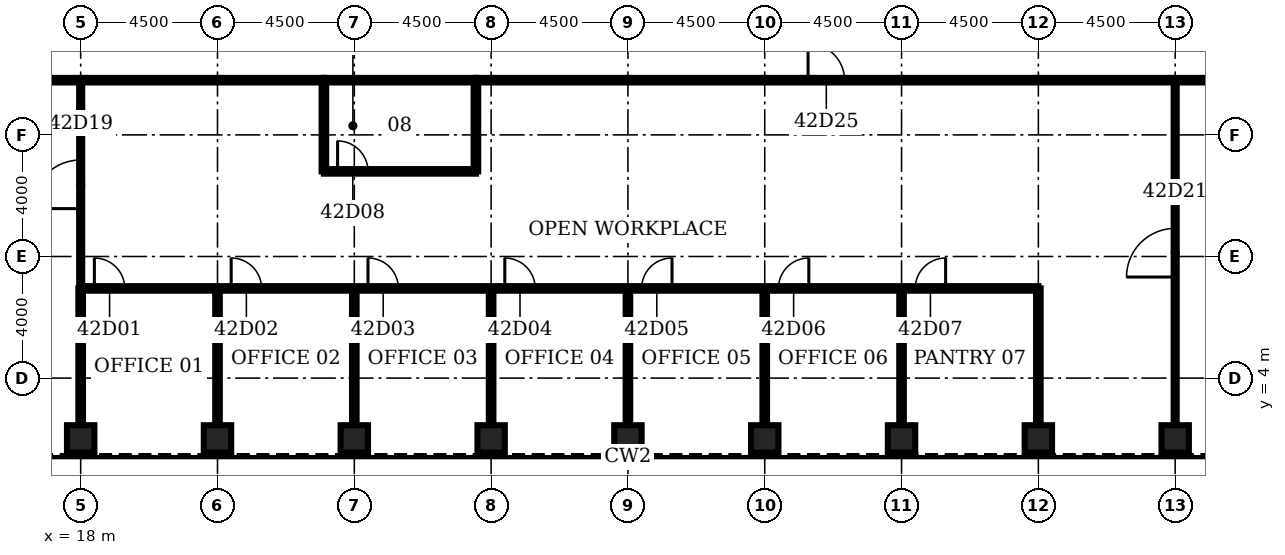
"""IFC4 building model, lengths in metres.
Left out: names, types, materials, properties, quantities, classifications, styles, units other than length and angle.
Written with IfcOpenShell. Run it as: python <this file> out.ifc"""

import sys

from ifc_helpers import new_model, si_unit, direction, frame, frame_2d, origin, origin_2d, place, context, subcontext, project, spatial, rectangle, hollow_rectangle, extrude, element, fill, save


model = new_model("IFC4")
c1 = context("Model", 3, precision=1e-05, world=origin(), true_north=direction((0.0, 1.0)))
c2 = subcontext(c1, "Body", "Model", "MODEL_VIEW")
j1 = project(units=[si_unit("LENGTHUNIT", "METRE"), si_unit("PLANEANGLEUNIT", "RADIAN")], contexts=[c1])
p1 = place(None, origin())
s1 = spatial("IfcSite", under=j1, at=p1, CompositionType="ELEMENT")
p2 = place(p1, origin())
s2 = spatial("IfcBuilding", under=s1, at=p2, CompositionType="ELEMENT")
p3 = place(p2, frame((0.0, 0.0, 190.0)))
s3 = spatial("IfcBuildingStorey", under=s2, at=p3, CompositionType="ELEMENT", Elevation=190.0)
for number, where, z_axis, x_axis in (
    (1, (18.0, 2.0, 0.0), (0.0, 0.0, 1.0), (0.0, 1.0, 0.0)),
    (2, (22.5, 2.0, 0.0), (0.0, 0.0, 1.0), (0.0, 1.0, 0.0)),
    (3, (27.0, 2.0, 0.0), (0.0, 0.0, 1.0), (0.0, 1.0, 0.0)),
    (4, (31.5, 2.0, 0.0), (0.0, 0.0, 1.0), (0.0, 1.0, 0.0)),
    (5, (36.0, 2.0, 0.0), (0.0, 0.0, 1.0), (0.0, 1.0, 0.0)),
    (6, (40.5, 2.0, 0.0), (0.0, 0.0, 1.0), (0.0, 1.0, 0.0)),
    (7, (45.0, 2.0, 0.0), (0.0, 0.0, 1.0), (0.0, 1.0, 0.0)),
    (8, (49.5, 2.0, 0.0), (0.0, 0.0, 1.0), (0.0, 1.0, 0.0)),
    (9, (54.0, 2.0, 0.0), (0.0, 0.0, 1.0), (0.0, 1.0, 0.0)),
):
    element("IfcColumn", number, at=place(p3, frame(where, z_axis=z_axis, x_axis=x_axis)), inside=s3, PredefinedType="COLUMN", context=c2, shape_type="SweptSolid", body=[
        extrude(hollow_rectangle(XDim=0.9, YDim=0.9, WallThickness=0.09, at=origin_2d()), origin(), (0.0, 0.0, 1.0), 4.2),
    ])
p4 = place(p3, frame((18.0, 6.95, 0.0), z_axis=(0.0, 0.0, 1.0), x_axis=(1.0, 0.0, 0.0)))
e10 = element("IfcWall", 10, at=p4, inside=s3, PredefinedType="PARTITIONING", context=c2, shape_type="SweptSolid", body=[
    extrude(rectangle(XDim=31.5, YDim=0.15, at=frame_2d((15.75, 0.0))), origin(), (0.0, 0.0, 1.0), 3.0),
])
p5 = place(p4, frame((0.45, 0.0, 0.0)))
e11 = element("IfcOpeningElement", 11, at=p5, cuts=e10, PredefinedType="OPENING", context=c2, shape_type="SweptSolid", body=[
    extrude(rectangle(XDim=1.0, YDim=2.1, at=frame_2d((0.5, 1.05))), frame((0.0, 0.085, 0.0), z_axis=(0.0, -1.0, 0.0), x_axis=(1.0, 0.0, 0.0)), (0.0, 0.0, 1.0), 0.17),
])
p6 = place(p4, frame((4.95, 0.0, 0.0)))
e12 = element("IfcOpeningElement", 12, at=p6, cuts=e10, PredefinedType="OPENING", context=c2, shape_type="SweptSolid", body=[
    extrude(rectangle(XDim=1.0, YDim=2.1, at=frame_2d((0.5, 1.05))), frame((0.0, 0.085, 0.0), z_axis=(0.0, -1.0, 0.0), x_axis=(1.0, 0.0, 0.0)), (0.0, 0.0, 1.0), 0.17),
])
p7 = place(p4, frame((9.45, 0.0, 0.0)))
e13 = element("IfcOpeningElement", 13, at=p7, cuts=e10, PredefinedType="OPENING", context=c2, shape_type="SweptSolid", body=[
    extrude(rectangle(XDim=1.0, YDim=2.1, at=frame_2d((0.5, 1.05))), frame((0.0, 0.085, 0.0), z_axis=(0.0, -1.0, 0.0), x_axis=(1.0, 0.0, 0.0)), (0.0, 0.0, 1.0), 0.17),
])
p8 = place(p4, frame((13.95, 0.0, 0.0)))
e14 = element("IfcOpeningElement", 14, at=p8, cuts=e10, PredefinedType="OPENING", context=c2, shape_type="SweptSolid", body=[
    extrude(rectangle(XDim=1.0, YDim=2.1, at=frame_2d((0.5, 1.05))), frame((0.0, 0.085, 0.0), z_axis=(0.0, -1.0, 0.0), x_axis=(1.0, 0.0, 0.0)), (0.0, 0.0, 1.0), 0.17),
])
p9 = place(p4, frame((18.45, 0.0, 0.0)))
e15 = element("IfcOpeningElement", 15, at=p9, cuts=e10, PredefinedType="OPENING", context=c2, shape_type="SweptSolid", body=[
    extrude(rectangle(XDim=1.0, YDim=2.1, at=frame_2d((0.5, 1.05))), frame((0.0, 0.085, 0.0), z_axis=(0.0, -1.0, 0.0), x_axis=(1.0, 0.0, 0.0)), (0.0, 0.0, 1.0), 0.17),
])
p10 = place(p4, frame((22.95, 0.0, 0.0)))
e16 = element("IfcOpeningElement", 16, at=p10, cuts=e10, PredefinedType="OPENING", context=c2, shape_type="SweptSolid", body=[
    extrude(rectangle(XDim=1.0, YDim=2.1, at=frame_2d((0.5, 1.05))), frame((0.0, 0.085, 0.0), z_axis=(0.0, -1.0, 0.0), x_axis=(1.0, 0.0, 0.0)), (0.0, 0.0, 1.0), 0.17),
])
p11 = place(p4, frame((27.45, 0.0, 0.0)))
e17 = element("IfcOpeningElement", 17, at=p11, cuts=e10, PredefinedType="OPENING", context=c2, shape_type="SweptSolid", body=[
    extrude(rectangle(XDim=1.0, YDim=2.1, at=frame_2d((0.5, 1.05))), frame((0.0, 0.085, 0.0), z_axis=(0.0, -1.0, 0.0), x_axis=(1.0, 0.0, 0.0)), (0.0, 0.0, 1.0), 0.17),
])
p12 = place(p3, frame((26.0, 10.8, 0.0), z_axis=(0.0, 0.0, 1.0), x_axis=(1.0, 0.0, 0.0)))
e18 = element("IfcWall", 18, at=p12, inside=s3, PredefinedType="PARTITIONING", context=c2, shape_type="SweptSolid", body=[
    extrude(rectangle(XDim=5.0, YDim=0.15, at=frame_2d((2.5, 0.0))), origin(), (0.0, 0.0, 1.0), 3.0),
])
p13 = place(p12, frame((0.45, 0.0, 0.0)))
e19 = element("IfcOpeningElement", 19, at=p13, cuts=e18, PredefinedType="OPENING", context=c2, shape_type="SweptSolid", body=[
    extrude(rectangle(XDim=1.0, YDim=2.1, at=frame_2d((0.5, 1.05))), frame((0.0, 0.085, 0.0), z_axis=(0.0, -1.0, 0.0), x_axis=(1.0, 0.0, 0.0)), (0.0, 0.0, 1.0), 0.17),
])
p14 = place(p3, frame((15.2, 13.8, 0.0), z_axis=(0.0, 0.0, 1.0), x_axis=(1.0, 0.0, 0.0)))
e20 = element("IfcWall", 20, at=p14, inside=s3, PredefinedType="PARTITIONING", context=c2, shape_type="SweptSolid", body=[
    extrude(rectangle(XDim=10.8, YDim=0.15, at=frame_2d((5.4, 0.0))), origin(), (0.0, 0.0, 1.0), 3.0),
])
p15 = place(p3, frame((26.0, 13.8, 0.0), z_axis=(0.0, 0.0, 1.0), x_axis=(1.0, 0.0, 0.0)))
e21 = element("IfcWall", 21, at=p15, inside=s3, PredefinedType="PARTITIONING", context=c2, shape_type="SweptSolid", body=[
    extrude(rectangle(XDim=5.0, YDim=0.15, at=frame_2d((2.5, 0.0))), origin(), (0.0, 0.0, 1.0), 3.0),
])
p16 = place(p3, frame((31.0, 13.8, 0.0), z_axis=(0.0, 0.0, 1.0), x_axis=(1.0, 0.0, 0.0)))
e22 = element("IfcWall", 22, at=p16, inside=s3, PredefinedType="PARTITIONING", context=c2, shape_type="SweptSolid", body=[
    extrude(rectangle(XDim=25.8, YDim=0.15, at=frame_2d((12.9, 0.0))), origin(), (0.0, 0.0, 1.0), 3.0),
])
p17 = place(p16, frame((10.925, 0.0, 0.0)))
e23 = element("IfcOpeningElement", 23, at=p17, cuts=e22, PredefinedType="OPENING", context=c2, shape_type="SweptSolid", body=[
    extrude(rectangle(XDim=1.2, YDim=2.1, at=frame_2d((0.6, 1.05))), frame((0.0, 0.085, 0.0), z_axis=(0.0, -1.0, 0.0), x_axis=(1.0, 0.0, 0.0)), (0.0, 0.0, 1.0), 0.17),
])
p18 = place(p3, frame((18.0, 2.45, 0.0), z_axis=(0.0, 0.0, 1.0), x_axis=(0.0, 1.0, 0.0)))
e24 = element("IfcWall", 24, at=p18, inside=s3, PredefinedType="PARTITIONING", context=c2, shape_type="SweptSolid", body=[
    extrude(rectangle(XDim=4.5, YDim=0.15, at=frame_2d((2.25, 0.0))), origin(), (0.0, 0.0, 1.0), 3.0),
])
p19 = place(p3, frame((18.0, 6.95, 0.0), z_axis=(0.0, 0.0, 1.0), x_axis=(0.0, 1.0, 0.0)))
e25 = element("IfcWall", 25, at=p19, inside=s3, PredefinedType="PARTITIONING", context=c2, shape_type="SweptSolid", body=[
    extrude(rectangle(XDim=6.85, YDim=0.1, at=frame_2d((3.425, 0.0))), origin(), (0.0, 0.0, 1.0), 3.0),
])
p20 = place(p19, frame((2.625, 0.0, 0.0)))
e26 = element("IfcOpeningElement", 26, at=p20, cuts=e25, PredefinedType="OPENING", context=c2, shape_type="SweptSolid", body=[
    extrude(rectangle(XDim=1.6, YDim=2.1, at=frame_2d((0.8, 1.05))), frame((0.0, 0.06, 0.0), z_axis=(0.0, -1.0, 0.0), x_axis=(1.0, 0.0, 0.0)), (0.0, 0.0, 1.0), 0.12),
])
p21 = place(p3, frame((22.5, 2.45, 0.0), z_axis=(0.0, 0.0, 1.0), x_axis=(0.0, 1.0, 0.0)))
e27 = element("IfcWall", 27, at=p21, inside=s3, PredefinedType="PARTITIONING", context=c2, shape_type="SweptSolid", body=[
    extrude(rectangle(XDim=4.5, YDim=0.15, at=frame_2d((2.25, 0.0))), origin(), (0.0, 0.0, 1.0), 3.0),
])
p22 = place(p3, frame((26.0, 10.8, 0.0), z_axis=(0.0, 0.0, 1.0), x_axis=(0.0, 1.0, 0.0)))
e28 = element("IfcWall", 28, at=p22, inside=s3, PredefinedType="PARTITIONING", context=c2, shape_type="SweptSolid", body=[
    extrude(rectangle(XDim=3.0, YDim=0.15, at=frame_2d((1.5, 0.0))), origin(), (0.0, 0.0, 1.0), 3.0),
])
p23 = place(p3, frame((27.0, 2.45, 0.0), z_axis=(0.0, 0.0, 1.0), x_axis=(0.0, 1.0, 0.0)))
e29 = element("IfcWall", 29, at=p23, inside=s3, PredefinedType="PARTITIONING", context=c2, shape_type="SweptSolid", body=[
    extrude(rectangle(XDim=4.5, YDim=0.15, at=frame_2d((2.25, 0.0))), origin(), (0.0, 0.0, 1.0), 3.0),
])
p24 = place(p3, frame((31.0, 10.8, 0.0), z_axis=(0.0, 0.0, 1.0), x_axis=(0.0, 1.0, 0.0)))
e30 = element("IfcWall", 30, at=p24, inside=s3, PredefinedType="PARTITIONING", context=c2, shape_type="SweptSolid", body=[
    extrude(rectangle(XDim=3.0, YDim=0.15, at=frame_2d((1.5, 0.0))), origin(), (0.0, 0.0, 1.0), 3.0),
])
for number, where, z_axis, x_axis in (
    (31, (31.5, 2.45, 0.0), (0.0, 0.0, 1.0), (0.0, 1.0, 0.0)),
    (32, (36.0, 2.45, 0.0), (0.0, 0.0, 1.0), (0.0, 1.0, 0.0)),
    (33, (40.5, 2.45, 0.0), (0.0, 0.0, 1.0), (0.0, 1.0, 0.0)),
    (34, (45.0, 2.45, 0.0), (0.0, 0.0, 1.0), (0.0, 1.0, 0.0)),
    (35, (49.5, 2.45, 0.0), (0.0, 0.0, 1.0), (0.0, 1.0, 0.0)),
):
    element("IfcWall", number, at=place(p3, frame(where, z_axis=z_axis, x_axis=x_axis)), inside=s3, PredefinedType="PARTITIONING", context=c2, shape_type="SweptSolid", body=[
        extrude(rectangle(XDim=4.5, YDim=0.15, at=frame_2d((2.25, 0.0))), origin(), (0.0, 0.0, 1.0), 3.0),
    ])
p25 = place(p3, frame((54.0, 2.45, 0.0), z_axis=(0.0, 0.0, 1.0), x_axis=(0.0, 1.0, 0.0)))
e36 = element("IfcWall", 36, at=p25, inside=s3, PredefinedType="PARTITIONING", context=c2, shape_type="SweptSolid", body=[
    extrude(rectangle(XDim=11.35, YDim=0.1, at=frame_2d((5.675, 0.0))), origin(), (0.0, 0.0, 1.0), 3.0),
])
p26 = place(p25, frame((4.875, 0.0, 0.0)))
e37 = element("IfcOpeningElement", 37, at=p26, cuts=e36, PredefinedType="OPENING", context=c2, shape_type="SweptSolid", body=[
    extrude(rectangle(XDim=1.6, YDim=2.1, at=frame_2d((0.8, 1.05))), frame((0.0, 0.06, 0.0), z_axis=(0.0, -1.0, 0.0), x_axis=(1.0, 0.0, 0.0)), (0.0, 0.0, 1.0), 0.12),
])
p27 = place(p5, origin())
e38 = element("IfcDoor", 38, at=p27, inside=s3, OperationType="SINGLE_SWING_LEFT", PredefinedType="DOOR", context=c2, shape_type="SweptSolid", body=[
    extrude(rectangle(XDim=1.0, YDim=2.1, at=frame_2d((0.5, 1.05))), frame((0.0, 0.025, 0.0), z_axis=(0.0, -1.0, 0.0), x_axis=(1.0, 0.0, 0.0)), (0.0, 0.0, 1.0), 0.05),
])
fill(e11, e38)
p28 = place(p6, origin())
e39 = element("IfcDoor", 39, at=p28, inside=s3, OperationType="SINGLE_SWING_LEFT", PredefinedType="DOOR", context=c2, shape_type="SweptSolid", body=[
    extrude(rectangle(XDim=1.0, YDim=2.1, at=frame_2d((0.5, 1.05))), frame((0.0, 0.025, 0.0), z_axis=(0.0, -1.0, 0.0), x_axis=(1.0, 0.0, 0.0)), (0.0, 0.0, 1.0), 0.05),
])
fill(e12, e39)
p29 = place(p7, origin())
e40 = element("IfcDoor", 40, at=p29, inside=s3, OperationType="SINGLE_SWING_LEFT", PredefinedType="DOOR", context=c2, shape_type="SweptSolid", body=[
    extrude(rectangle(XDim=1.0, YDim=2.1, at=frame_2d((0.5, 1.05))), frame((0.0, 0.025, 0.0), z_axis=(0.0, -1.0, 0.0), x_axis=(1.0, 0.0, 0.0)), (0.0, 0.0, 1.0), 0.05),
])
fill(e13, e40)
p30 = place(p8, origin())
e41 = element("IfcDoor", 41, at=p30, inside=s3, OperationType="SINGLE_SWING_LEFT", PredefinedType="DOOR", context=c2, shape_type="SweptSolid", body=[
    extrude(rectangle(XDim=1.0, YDim=2.1, at=frame_2d((0.5, 1.05))), frame((0.0, 0.025, 0.0), z_axis=(0.0, -1.0, 0.0), x_axis=(1.0, 0.0, 0.0)), (0.0, 0.0, 1.0), 0.05),
])
fill(e14, e41)
p31 = place(p9, origin())
e42 = element("IfcDoor", 42, at=p31, inside=s3, OperationType="SINGLE_SWING_RIGHT", PredefinedType="DOOR", context=c2, shape_type="SweptSolid", body=[
    extrude(rectangle(XDim=1.0, YDim=2.1, at=frame_2d((0.5, 1.05))), frame((0.0, 0.025, 0.0), z_axis=(0.0, -1.0, 0.0), x_axis=(1.0, 0.0, 0.0)), (0.0, 0.0, 1.0), 0.05),
])
fill(e15, e42)
p32 = place(p10, origin())
e43 = element("IfcDoor", 43, at=p32, inside=s3, OperationType="SINGLE_SWING_RIGHT", PredefinedType="DOOR", context=c2, shape_type="SweptSolid", body=[
    extrude(rectangle(XDim=1.0, YDim=2.1, at=frame_2d((0.5, 1.05))), frame((0.0, 0.025, 0.0), z_axis=(0.0, -1.0, 0.0), x_axis=(1.0, 0.0, 0.0)), (0.0, 0.0, 1.0), 0.05),
])
fill(e16, e43)
p33 = place(p11, origin())
e44 = element("IfcDoor", 44, at=p33, inside=s3, OperationType="SINGLE_SWING_RIGHT", PredefinedType="DOOR", context=c2, shape_type="SweptSolid", body=[
    extrude(rectangle(XDim=1.0, YDim=2.1, at=frame_2d((0.5, 1.05))), frame((0.0, 0.025, 0.0), z_axis=(0.0, -1.0, 0.0), x_axis=(1.0, 0.0, 0.0)), (0.0, 0.0, 1.0), 0.05),
])
fill(e17, e44)
p34 = place(p13, origin())
e45 = element("IfcDoor", 45, at=p34, inside=s3, OperationType="SINGLE_SWING_LEFT", PredefinedType="DOOR", context=c2, shape_type="SweptSolid", body=[
    extrude(rectangle(XDim=1.0, YDim=2.1, at=frame_2d((0.5, 1.05))), frame((0.0, 0.025, 0.0), z_axis=(0.0, -1.0, 0.0), x_axis=(1.0, 0.0, 0.0)), (0.0, 0.0, 1.0), 0.05),
])
fill(e19, e45)
p35 = place(p20, origin())
e46 = element("IfcDoor", 46, at=p35, inside=s3, OperationType="SINGLE_SWING_LEFT", PredefinedType="DOOR", context=c2, shape_type="SweptSolid", body=[
    extrude(rectangle(XDim=1.6, YDim=2.1, at=frame_2d((0.8, 1.05))), frame((0.0, 0.025, 0.0), z_axis=(0.0, -1.0, 0.0), x_axis=(1.0, 0.0, 0.0)), (0.0, 0.0, 1.0), 0.05),
])
fill(e26, e46)
p36 = place(p26, origin())
e47 = element("IfcDoor", 47, at=p36, inside=s3, OperationType="SINGLE_SWING_LEFT", PredefinedType="DOOR", context=c2, shape_type="SweptSolid", body=[
    extrude(rectangle(XDim=1.6, YDim=2.1, at=frame_2d((0.8, 1.05))), frame((0.0, 0.025, 0.0), z_axis=(0.0, -1.0, 0.0), x_axis=(1.0, 0.0, 0.0)), (0.0, 0.0, 1.0), 0.05),
])
fill(e37, e47)
p37 = place(p17, origin())
e48 = element("IfcDoor", 48, at=p37, inside=s3, OperationType="SINGLE_SWING_LEFT", PredefinedType="DOOR", context=c2, shape_type="SweptSolid", body=[
    extrude(rectangle(XDim=1.2, YDim=2.1, at=frame_2d((0.6, 1.05))), frame((0.0, 0.025, 0.0), z_axis=(0.0, -1.0, 0.0), x_axis=(1.0, 0.0, 0.0)), (0.0, 0.0, 1.0), 0.05),
])
fill(e23, e48)
save(model, sys.argv[1])
